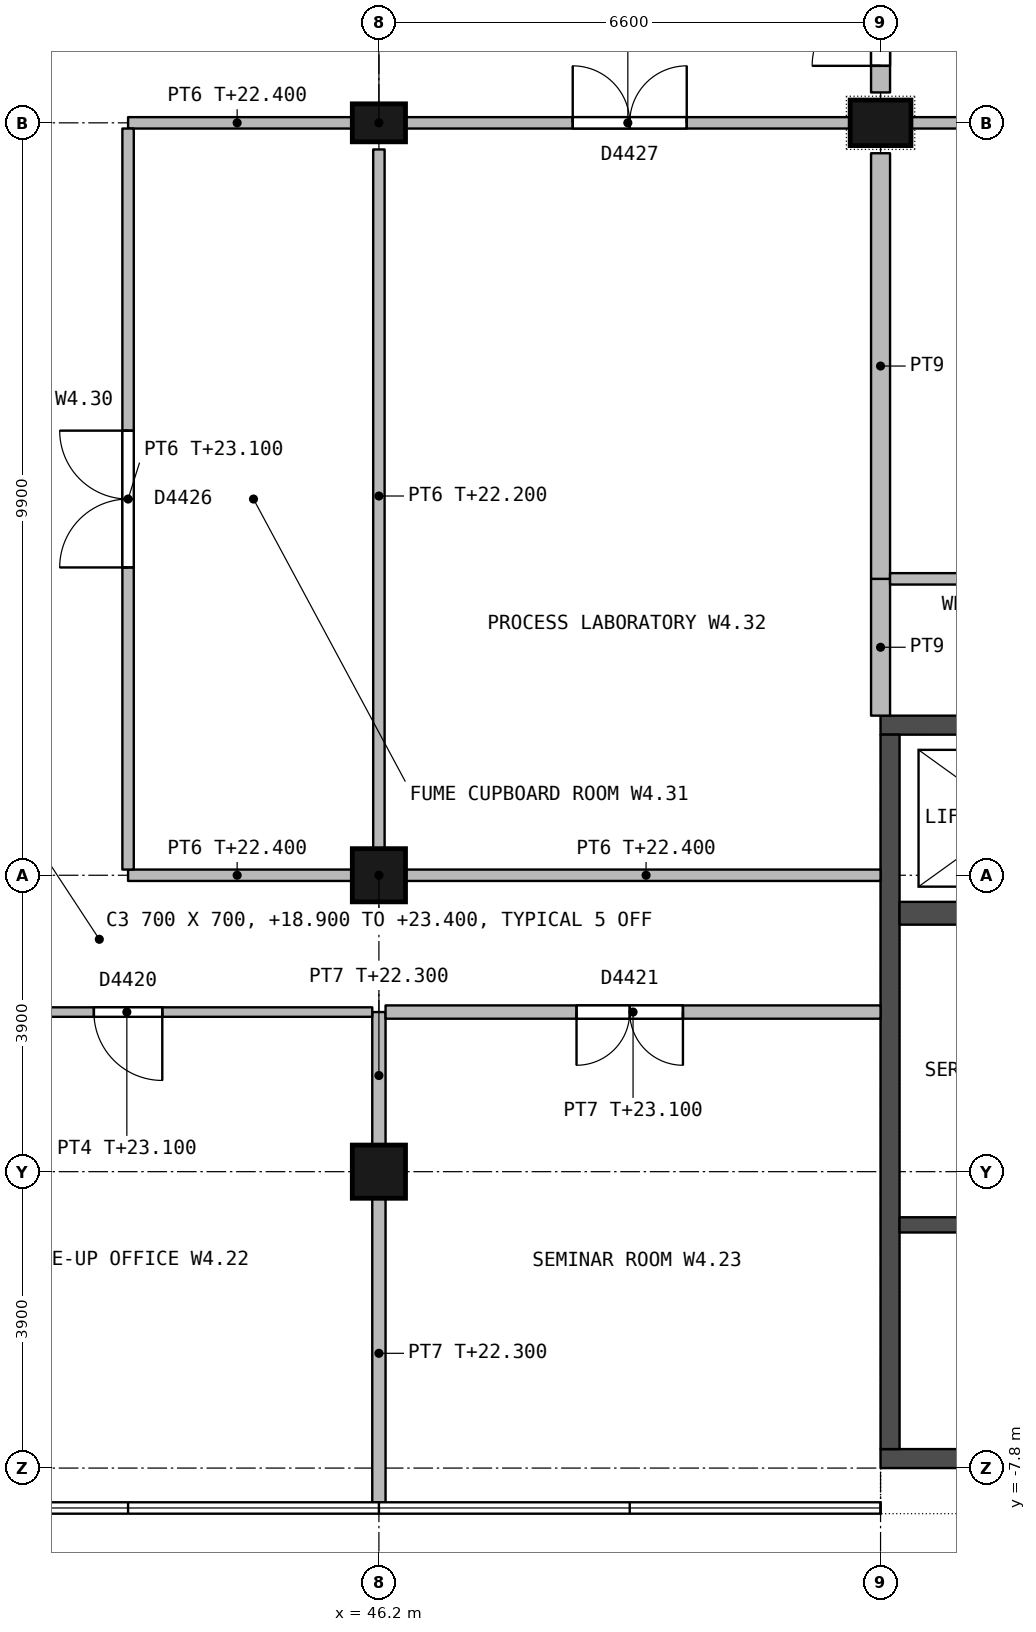
"""IFC4 building model, lengths in metres.
Left out: names, types, materials, properties, quantities, classifications, styles, units other than length and angle.
Written with IfcOpenShell. Run it as: python <this file> out.ifc"""

import sys

from ifc_helpers import new_model, si_unit, direction, frame, frame_2d, origin, origin_2d, place, context, subcontext, project, spatial, rectangle, extrude, element, fill, save


model = new_model("IFC4")
c1 = context("Model", 3, precision=1e-05, world=origin(), true_north=direction((0.0, 1.0)))
c2 = subcontext(c1, "Body", "Model", "MODEL_VIEW")
j1 = project(units=[si_unit("LENGTHUNIT", "METRE"), si_unit("PLANEANGLEUNIT", "RADIAN")], contexts=[c1])
p1 = place(None, origin())
s1 = spatial("IfcSite", under=j1, at=p1, CompositionType="ELEMENT")
p2 = place(p1, origin())
s2 = spatial("IfcBuilding", under=s1, at=p2, CompositionType="ELEMENT")
p3 = place(p2, frame((0.0, 0.0, 18.9)))
s3 = spatial("IfcBuildingStorey", under=s2, at=p3, CompositionType="ELEMENT", Elevation=18.9)
p4 = place(p3, frame((46.2, 0.0, 0.0), z_axis=(0.0, 0.0, 1.0), x_axis=(1.0, 0.0, 0.0)))
e1 = element("IfcColumn", 1, at=p4, inside=s3, PredefinedType="COLUMN", context=c2, shape_type="SweptSolid", body=[
    extrude(rectangle(XDim=0.7, YDim=0.7, at=origin_2d()), origin(), (0.0, 0.0, 1.0), 4.5),
])
p5 = place(p3, frame((46.2, 9.9, 0.0), z_axis=(0.0, 0.0, 1.0), x_axis=(1.0, 0.0, 0.0)))
e2 = element("IfcColumn", 2, at=p5, inside=s3, PredefinedType="COLUMN", context=c2, shape_type="SweptSolid", body=[
    extrude(rectangle(XDim=0.7, YDim=0.5, at=origin_2d()), origin(), (0.0, 0.0, 1.0), 4.5),
])
p6 = place(p3, frame((52.8, 9.9, 0.0), z_axis=(0.0, 0.0, 1.0), x_axis=(1.0, 0.0, 0.0)))
e3 = element("IfcColumn", 3, at=p6, inside=s3, PredefinedType="COLUMN", context=c2, shape_type="SweptSolid", body=[
    extrude(rectangle(XDim=0.8, YDim=0.6, at=origin_2d()), origin(), (0.0, 0.0, 1.0), 4.5),
])
p7 = place(p3, frame((46.2, -3.9, 0.0), z_axis=(0.0, 0.0, 1.0), x_axis=(1.0, 0.0, 0.0)))
e4 = element("IfcColumn", 4, at=p7, inside=s3, PredefinedType="COLUMN", context=c2, shape_type="SweptSolid", body=[
    extrude(rectangle(XDim=0.7, YDim=0.7, at=origin_2d()), origin(), (0.0, 0.0, 1.0), 4.5),
])
p8 = place(p3, frame((59.4, 1.975, 0.0), z_axis=(0.0, 0.0, 1.0), x_axis=(-1.0, 0.0, 0.0)))
e5 = element("IfcWall", 5, at=p8, inside=s3, PredefinedType="SHEAR", context=c2, shape_type="SweptSolid", body=[
    extrude(rectangle(XDim=6.6, YDim=0.25, at=frame_2d((3.3, 0.0))), origin(), (0.0, 0.0, 1.0), 4.2),
])
p9 = place(p8, frame((0.95, 0.0, 0.0)))
e6 = element("IfcOpeningElement", 6, at=p9, cuts=e5, PredefinedType="OPENING", context=c2, shape_type="SweptSolid", body=[
    extrude(rectangle(XDim=1.1, YDim=2.1, at=frame_2d((0.55, 1.05))), frame((0.0, 0.135, 0.0), z_axis=(0.0, -1.0, 0.0), x_axis=(1.0, 0.0, 0.0)), (0.0, 0.0, 1.0), 0.27),
])
p10 = place(p3, frame((59.4, -7.675, 0.0), z_axis=(0.0, 0.0, 1.0), x_axis=(-1.0, 0.0, 0.0)))
e7 = element("IfcWall", 7, at=p10, inside=s3, PredefinedType="SHEAR", context=c2, shape_type="SweptSolid", body=[
    extrude(rectangle(XDim=6.6, YDim=0.25, at=frame_2d((3.3, 0.0))), origin(), (0.0, 0.0, 1.0), 4.2),
])
p11 = place(p3, frame((52.925, 1.85, 0.0), z_axis=(0.0, 0.0, 1.0), x_axis=(0.0, -1.0, 0.0)))
e8 = element("IfcWall", 8, at=p11, inside=s3, PredefinedType="SHEAR", context=c2, shape_type="SweptSolid", body=[
    extrude(rectangle(XDim=9.4, YDim=0.25, at=frame_2d((4.7, 0.0))), origin(), (0.0, 0.0, 1.0), 4.2),
])
p12 = place(p3, frame((59.15, -4.6, 0.0), z_axis=(0.0, 0.0, 1.0), x_axis=(-1.0, 0.0, 0.0)))
e9 = element("IfcWall", 9, at=p12, inside=s3, PredefinedType="SHEAR", context=c2, shape_type="SweptSolid", body=[
    extrude(rectangle(XDim=6.1, YDim=0.2, at=frame_2d((3.05, 0.0))), origin(), (0.0, 0.0, 1.0), 4.2),
])
p13 = place(p12, frame((0.175, 0.0, 0.0)))
e10 = element("IfcOpeningElement", 10, at=p13, cuts=e9, PredefinedType="OPENING", context=c2, shape_type="SweptSolid", body=[
    extrude(rectangle(XDim=1.0, YDim=2.1, at=frame_2d((0.5, 1.05))), frame((0.0, 0.11, 0.0), z_axis=(0.0, -1.0, 0.0), x_axis=(1.0, 0.0, 0.0)), (0.0, 0.0, 1.0), 0.22),
])
p14 = place(p3, frame((55.85, -0.5, 0.0), z_axis=(0.0, 0.0, 1.0), x_axis=(-1.0, 0.0, 0.0)))
e11 = element("IfcWall", 11, at=p14, inside=s3, PredefinedType="SHEAR", context=c2, shape_type="SweptSolid", body=[
    extrude(rectangle(XDim=2.8, YDim=0.3, at=frame_2d((1.4, 0.0))), origin(), (0.0, 0.0, 1.0), 4.2),
])
p15 = place(p3, frame((42.9, 9.9, 0.0), z_axis=(0.0, 0.0, 1.0), x_axis=(1.0, 0.0, 0.0)))
e12 = element("IfcWall", 12, at=p15, inside=s3, PredefinedType="PARTITIONING", context=c2, shape_type="SweptSolid", body=[
    extrude(rectangle(XDim=2.95, YDim=0.15, at=frame_2d((1.475, 0.0))), origin(), (0.0, 0.0, 1.0), 3.5),
])
p16 = place(p3, frame((46.55, 9.9, 0.0), z_axis=(0.0, 0.0, 1.0), x_axis=(1.0, 0.0, 0.0)))
e13 = element("IfcWall", 13, at=p16, inside=s3, PredefinedType="PARTITIONING", context=c2, shape_type="SweptSolid", body=[
    extrude(rectangle(XDim=5.85, YDim=0.15, at=frame_2d((2.925, 0.0))), origin(), (0.0, 0.0, 1.0), 3.5),
])
p17 = place(p16, frame((2.2, 0.0, 0.0)))
e14 = element("IfcOpeningElement", 14, at=p17, cuts=e13, PredefinedType="OPENING", context=c2, shape_type="SweptSolid", body=[
    extrude(rectangle(XDim=1.5, YDim=2.1, at=frame_2d((0.75, 1.05))), frame((0.0, 0.085, 0.0), z_axis=(0.0, -1.0, 0.0), x_axis=(1.0, 0.0, 0.0)), (0.0, 0.0, 1.0), 0.17),
])
p18 = place(p3, frame((52.8, 10.3, 0.0), z_axis=(0.0, 0.0, 1.0), x_axis=(0.0, 1.0, 0.0)))
e15 = element("IfcWall", 15, at=p18, inside=s3, PredefinedType="PARTITIONING", context=c2, shape_type="SweptSolid", body=[
    extrude(rectangle(XDim=2.5, YDim=0.25, at=frame_2d((1.25, 0.0))), origin(), (0.0, 0.0, 1.0), 3.6),
])
p19 = place(p18, frame((0.35, 0.0, 0.0)))
e16 = element("IfcOpeningElement", 16, at=p19, cuts=e15, PredefinedType="OPENING", context=c2, shape_type="SweptSolid", body=[
    extrude(rectangle(XDim=1.8, YDim=2.1, at=frame_2d((0.9, 1.05))), frame((0.0, 0.135, 0.0), z_axis=(0.0, -1.0, 0.0), x_axis=(1.0, 0.0, 0.0)), (0.0, 0.0, 1.0), 0.27),
])
p20 = place(p3, frame((46.2, -8.25, 0.0), z_axis=(0.0, 0.0, 1.0), x_axis=(0.0, 1.0, 0.0)))
e17 = element("IfcWall", 17, at=p20, inside=s3, PredefinedType="PARTITIONING", context=c2, shape_type="SweptSolid", body=[
    extrude(rectangle(XDim=4.0, YDim=0.175, at=frame_2d((2.0, 0.0))), origin(), (0.0, 0.0, 1.0), 3.4),
])
p21 = place(p3, frame((46.2, -3.55, 0.0), z_axis=(0.0, 0.0, 1.0), x_axis=(0.0, 1.0, 0.0)))
e18 = element("IfcWall", 18, at=p21, inside=s3, PredefinedType="PARTITIONING", context=c2, shape_type="SweptSolid", body=[
    extrude(rectangle(XDim=1.75, YDim=0.175, at=frame_2d((0.875, 0.0))), origin(), (0.0, 0.0, 1.0), 3.4),
])
p22 = place(p3, frame((46.113, -1.8, 0.0), z_axis=(0.0, 0.0, 1.0), x_axis=(-1.0, 0.0, 0.0)))
e19 = element("IfcWall", 19, at=p22, inside=s3, PredefinedType="PARTITIONING", context=c2, shape_type="SweptSolid", body=[
    extrude(rectangle(XDim=6.458, YDim=0.125, at=frame_2d((3.229, 0.0))), origin(), (0.0, 0.0, 1.0), 4.2),
])
p23 = place(p22, frame((2.762, 0.0, 0.0)))
e20 = element("IfcOpeningElement", 20, at=p23, cuts=e19, PredefinedType="OPENING", context=c2, shape_type="SweptSolid", body=[
    extrude(rectangle(XDim=0.9, YDim=2.1, at=frame_2d((0.45, 1.05))), frame((0.0, 0.073, 0.0), z_axis=(0.0, -1.0, 0.0), x_axis=(1.0, 0.0, 0.0)), (0.0, 0.0, 1.0), 0.145),
])
p24 = place(p3, frame((52.8, -1.8, 0.0), z_axis=(0.0, 0.0, 1.0), x_axis=(-1.0, 0.0, 0.0)))
e21 = element("IfcWall", 21, at=p24, inside=s3, PredefinedType="PARTITIONING", context=c2, shape_type="SweptSolid", body=[
    extrude(rectangle(XDim=6.512, YDim=0.175, at=frame_2d((3.256, 0.0))), origin(), (0.0, 0.0, 1.0), 4.2),
])
p25 = place(p24, frame((2.6, 0.0, 0.0)))
e22 = element("IfcOpeningElement", 22, at=p25, cuts=e21, PredefinedType="OPENING", context=c2, shape_type="SweptSolid", body=[
    extrude(rectangle(XDim=1.4, YDim=2.1, at=frame_2d((0.7, 1.05))), frame((0.0, 0.097, 0.0), z_axis=(0.0, -1.0, 0.0), x_axis=(1.0, 0.0, 0.0)), (0.0, 0.0, 1.0), 0.195),
])
p26 = place(p3, frame((45.85, 0.0, 0.0), z_axis=(0.0, 0.0, 1.0), x_axis=(-1.0, 0.0, 0.0)))
e23 = element("IfcWall", 23, at=p26, inside=s3, PredefinedType="PARTITIONING", context=c2, shape_type="SweptSolid", body=[
    extrude(rectangle(XDim=2.95, YDim=0.15, at=frame_2d((1.475, 0.0))), origin(), (0.0, 0.0, 1.0), 3.5),
])
p27 = place(p3, frame((52.8, 0.0, 0.0), z_axis=(0.0, 0.0, 1.0), x_axis=(-1.0, 0.0, 0.0)))
e24 = element("IfcWall", 24, at=p27, inside=s3, PredefinedType="PARTITIONING", context=c2, shape_type="SweptSolid", body=[
    extrude(rectangle(XDim=6.25, YDim=0.15, at=frame_2d((3.125, 0.0))), origin(), (0.0, 0.0, 1.0), 3.5),
])
p28 = place(p3, frame((42.9, 0.075, 0.0), z_axis=(0.0, 0.0, 1.0), x_axis=(0.0, 1.0, 0.0)))
e25 = element("IfcWall", 25, at=p28, inside=s3, PredefinedType="PARTITIONING", context=c2, shape_type="SweptSolid", body=[
    extrude(rectangle(XDim=9.75, YDim=0.15, at=frame_2d((4.875, 0.0))), origin(), (0.0, 0.0, 1.0), 4.2),
])
p29 = place(p28, frame((3.975, 0.0, 0.0)))
e26 = element("IfcOpeningElement", 26, at=p29, cuts=e25, PredefinedType="OPENING", context=c2, shape_type="SweptSolid", body=[
    extrude(rectangle(XDim=1.8, YDim=2.4, at=frame_2d((0.9, 1.2))), frame((0.0, 0.085, 0.0), z_axis=(0.0, -1.0, 0.0), x_axis=(1.0, 0.0, 0.0)), (0.0, 0.0, 1.0), 0.17),
])
p30 = place(p3, frame((46.2, 0.35, 0.0), z_axis=(0.0, 0.0, 1.0), x_axis=(0.0, 1.0, 0.0)))
e27 = element("IfcWall", 27, at=p30, inside=s3, PredefinedType="PARTITIONING", context=c2, shape_type="SweptSolid", body=[
    extrude(rectangle(XDim=9.2, YDim=0.15, at=frame_2d((4.6, 0.0))), origin(), (0.0, 0.0, 1.0), 3.3),
])
p31 = place(p3, frame((52.8, 2.1, 0.0), z_axis=(0.0, 0.0, 1.0), x_axis=(0.0, 1.0, 0.0)))
e28 = element("IfcWall", 28, at=p31, inside=s3, PredefinedType="PARTITIONING", context=c2, shape_type="SweptSolid", body=[
    extrude(rectangle(XDim=1.8, YDim=0.25, at=frame_2d((0.9, 0.0))), origin(), (0.0, 0.0, 1.0), 3.3),
])
p32 = place(p3, frame((52.8, 3.9, 0.0), z_axis=(0.0, 0.0, 1.0), x_axis=(0.0, 1.0, 0.0)))
e29 = element("IfcWall", 29, at=p32, inside=s3, PredefinedType="PARTITIONING", context=c2, shape_type="SweptSolid", body=[
    extrude(rectangle(XDim=5.6, YDim=0.25, at=frame_2d((2.8, 0.0))), origin(), (0.0, 0.0, 1.0), 3.3),
])
p33 = place(p3, frame((53.2, 9.9, 0.0), z_axis=(0.0, 0.0, 1.0), x_axis=(1.0, 0.0, 0.0)))
e30 = element("IfcWall", 30, at=p33, inside=s3, PredefinedType="PARTITIONING", context=c2, shape_type="SweptSolid", body=[
    extrude(rectangle(XDim=5.8, YDim=0.15, at=frame_2d((2.9, 0.0))), origin(), (0.0, 0.0, 1.0), 3.5),
])
p34 = place(p33, frame((2.15, 0.0, 0.0)))
e31 = element("IfcOpeningElement", 31, at=p34, cuts=e30, PredefinedType="OPENING", context=c2, shape_type="SweptSolid", body=[
    extrude(rectangle(XDim=1.5, YDim=2.1, at=frame_2d((0.75, 1.05))), frame((0.0, 0.085, 0.0), z_axis=(0.0, -1.0, 0.0), x_axis=(1.0, 0.0, 0.0)), (0.0, 0.0, 1.0), 0.17),
])
p35 = place(p3, frame((59.4, 3.9, 0.0), z_axis=(0.0, 0.0, 1.0), x_axis=(-1.0, 0.0, 0.0)))
e32 = element("IfcWall", 32, at=p35, inside=s3, PredefinedType="PARTITIONING", context=c2, shape_type="SweptSolid", body=[
    extrude(rectangle(XDim=6.475, YDim=0.15, at=frame_2d((3.237, 0.0))), origin(), (0.0, 0.0, 1.0), 4.2),
])
p36 = place(p19, origin())
e33 = element("IfcDoor", 33, at=p36, inside=s3, OperationType="DOUBLE_DOOR_SINGLE_SWING", PredefinedType="DOOR", context=c2, shape_type="SweptSolid", body=[
    extrude(rectangle(XDim=1.8, YDim=2.1, at=frame_2d((0.9, 1.05))), frame((0.0, 0.03, 0.0), z_axis=(0.0, -1.0, 0.0), x_axis=(1.0, 0.0, 0.0)), (0.0, 0.0, 1.0), 0.06),
])
fill(e16, e33)
p37 = place(p23, origin())
e34 = element("IfcDoor", 34, at=p37, inside=s3, OperationType="SINGLE_SWING_LEFT", PredefinedType="DOOR", context=c2, shape_type="SweptSolid", body=[
    extrude(rectangle(XDim=0.9, YDim=2.1, at=frame_2d((0.45, 1.05))), frame((0.0, 0.027, 0.0), z_axis=(0.0, -1.0, 0.0), x_axis=(1.0, 0.0, 0.0)), (0.0, 0.0, 1.0), 0.054),
])
fill(e20, e34)
p38 = place(p25, origin())
e35 = element("IfcDoor", 35, at=p38, inside=s3, OperationType="DOUBLE_DOOR_SINGLE_SWING", PredefinedType="DOOR", context=c2, shape_type="SweptSolid", body=[
    extrude(rectangle(XDim=1.4, YDim=2.1, at=frame_2d((0.7, 1.05))), frame((0.0, 0.027, 0.0), z_axis=(0.0, -1.0, 0.0), x_axis=(1.0, 0.0, 0.0)), (0.0, 0.0, 1.0), 0.054),
])
fill(e22, e35)
p39 = place(p29, origin())
e36 = element("IfcDoor", 36, at=p39, inside=s3, OperationType="DOUBLE_DOOR_SINGLE_SWING", PredefinedType="DOOR", context=c2, shape_type="SweptSolid", body=[
    extrude(rectangle(XDim=1.8, YDim=2.4, at=frame_2d((0.9, 1.2))), frame((0.0, 0.027, 0.0), z_axis=(0.0, -1.0, 0.0), x_axis=(1.0, 0.0, 0.0)), (0.0, 0.0, 1.0), 0.054),
])
fill(e26, e36)
p40 = place(p17, origin())
e37 = element("IfcDoor", 37, at=p40, inside=s3, OperationType="DOUBLE_DOOR_SINGLE_SWING", PredefinedType="DOOR", context=c2, shape_type="SweptSolid", body=[
    extrude(rectangle(XDim=1.5, YDim=2.1, at=frame_2d((0.75, 1.05))), frame((0.0, 0.027, 0.0), z_axis=(0.0, -1.0, 0.0), x_axis=(1.0, 0.0, 0.0)), (0.0, 0.0, 1.0), 0.054),
])
fill(e14, e37)
save(model, sys.argv[1])
